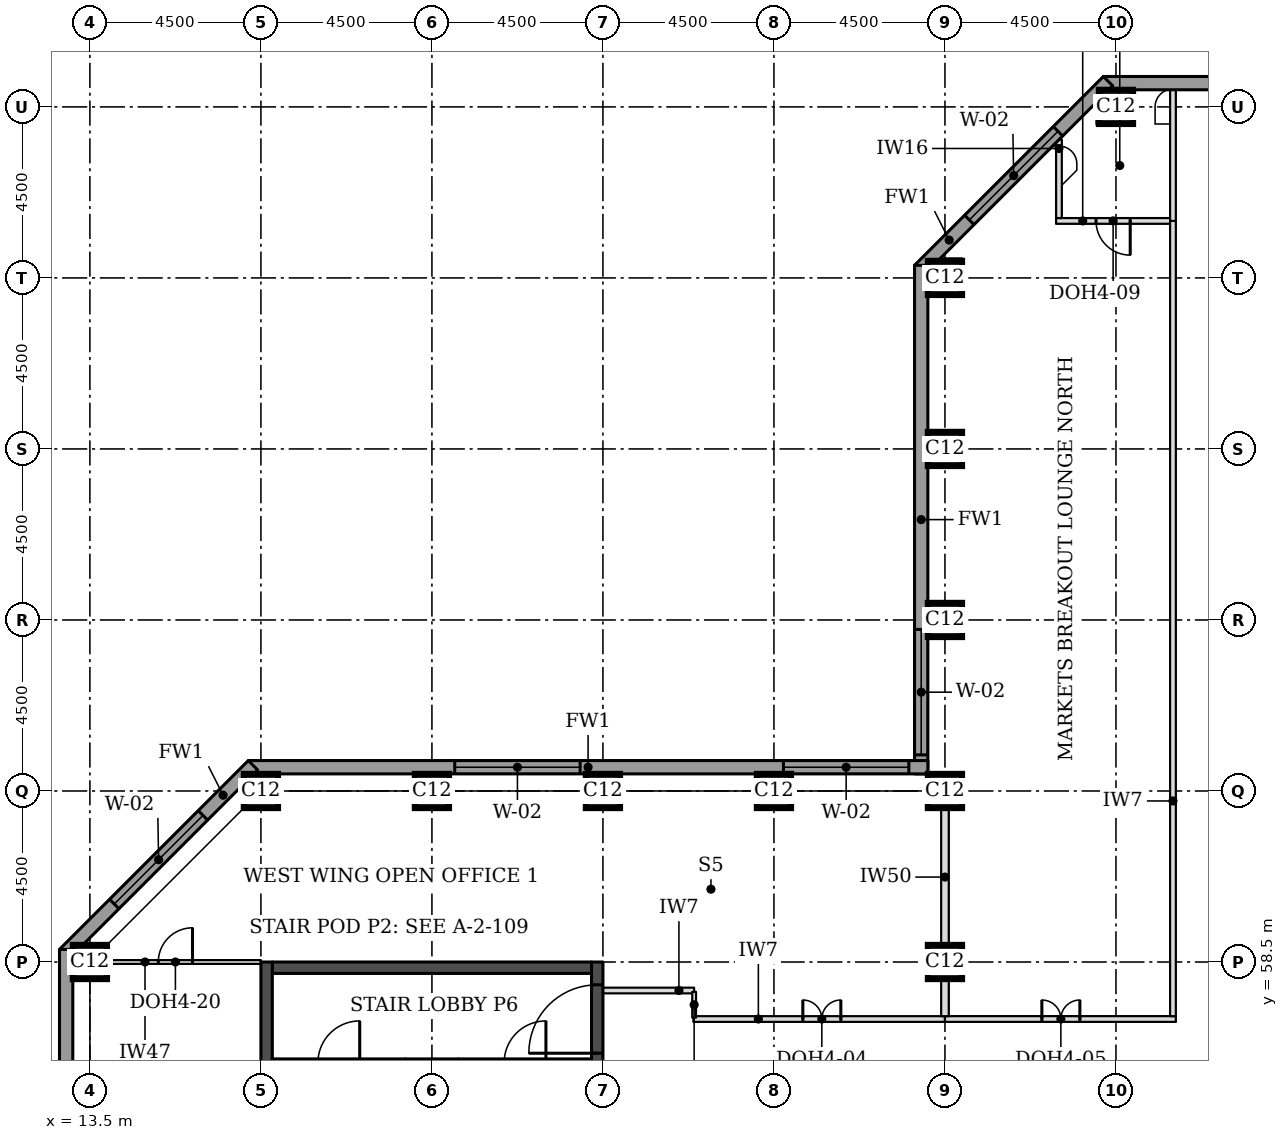
"""IFC4 building model, lengths in metres.
Left out: names, types, materials, properties, quantities, classifications, styles, units other than length and angle.
Written with IfcOpenShell. Run it as: python <this file> out.ifc"""

import sys

from ifc_helpers import new_model, si_unit, direction, frame, frame_2d, origin, origin_2d, place, context, subcontext, project, spatial, rectangle, extrude, element, fill, save


model = new_model("IFC4")
c1 = context("Model", 3, precision=1e-05, world=origin(), true_north=direction((0.0, 1.0)))
c2 = subcontext(c1, "Body", "Model", "MODEL_VIEW")
j1 = project(units=[si_unit("LENGTHUNIT", "METRE"), si_unit("PLANEANGLEUNIT", "RADIAN")], contexts=[c1])
p1 = place(None, origin())
s1 = spatial("IfcSite", under=j1, at=p1, CompositionType="ELEMENT")
p2 = place(p1, origin())
s2 = spatial("IfcBuilding", under=s1, at=p2, CompositionType="ELEMENT")
p3 = place(p2, frame((0.0, 0.0, 173.6)))
s3 = spatial("IfcBuildingStorey", under=s2, at=p3, CompositionType="ELEMENT", Elevation=173.6)
for number, where, z_axis, x_axis in (
    (1, (13.5, 58.5, 0.0), (0.0, 0.0, 1.0), (1.0, 0.0, 0.0)),
    (2, (36.0, 58.5, 0.0), (0.0, 0.0, 1.0), (1.0, 0.0, 0.0)),
    (3, (18.0, 63.0, 0.0), (0.0, 0.0, 1.0), (1.0, 0.0, 0.0)),
    (4, (22.5, 63.0, 0.0), (0.0, 0.0, 1.0), (1.0, 0.0, 0.0)),
    (5, (27.0, 63.0, 0.0), (0.0, 0.0, 1.0), (1.0, 0.0, 0.0)),
    (6, (31.5, 63.0, 0.0), (0.0, 0.0, 1.0), (1.0, 0.0, 0.0)),
    (7, (36.0, 63.0, 0.0), (0.0, 0.0, 1.0), (1.0, 0.0, 0.0)),
    (8, (36.0, 67.5, 0.0), (0.0, 0.0, 1.0), (1.0, 0.0, 0.0)),
    (9, (36.0, 72.0, 0.0), (0.0, 0.0, 1.0), (1.0, 0.0, 0.0)),
    (10, (36.0, 76.5, 0.0), (0.0, 0.0, 1.0), (1.0, 0.0, 0.0)),
    (11, (40.5, 81.0, 0.0), (0.0, 0.0, 1.0), (1.0, 0.0, 0.0)),
):
    element("IfcColumn", number, at=place(p3, frame(where, z_axis=z_axis, x_axis=x_axis)), inside=s3, PredefinedType="COLUMN", context=c2, shape_type="SweptSolid", body=[
        extrude(rectangle(XDim=0.9, YDim=0.9, at=origin_2d()), origin(), (0.0, 0.0, 1.0), 3.7),
    ])
p4 = place(p3, frame((18.3, 58.35, 0.0), z_axis=(0.0, 0.0, 1.0), x_axis=(1.0, 0.0, 0.0)))
e12 = element("IfcWall", 12, at=p4, inside=s3, PredefinedType="SHEAR", context=c2, shape_type="SweptSolid", body=[
    extrude(rectangle(XDim=8.4, YDim=0.3, at=frame_2d((4.2, 0.0))), origin(), (0.0, 0.0, 1.0), 3.7),
])
p5 = place(p3, frame((18.15, 49.5, 0.0), z_axis=(0.0, 0.0, 1.0), x_axis=(0.0, 1.0, 0.0)))
e13 = element("IfcWall", 13, at=p5, inside=s3, PredefinedType="SHEAR", context=c2, shape_type="SweptSolid", body=[
    extrude(rectangle(XDim=9.0, YDim=0.3, at=frame_2d((4.5, 0.0))), origin(), (0.0, 0.0, 1.0), 3.7),
])
p6 = place(p3, frame((26.85, 49.5, 0.0), z_axis=(0.0, 0.0, 1.0), x_axis=(0.0, 1.0, 0.0)))
e14 = element("IfcWall", 14, at=p6, inside=s3, PredefinedType="SHEAR", context=c2, shape_type="SweptSolid", body=[
    extrude(rectangle(XDim=9.0, YDim=0.3, at=frame_2d((4.5, 0.0))), origin(), (0.0, 0.0, 1.0), 3.7),
])
p7 = place(p6, frame((6.6, 0.0, 0.0)))
e15 = element("IfcOpeningElement", 15, at=p7, cuts=e14, PredefinedType="OPENING", context=c2, shape_type="SweptSolid", body=[
    extrude(rectangle(XDim=1.8, YDim=2.1, at=frame_2d((0.9, 1.05))), frame((0.0, 0.16, 0.0), z_axis=(0.0, -1.0, 0.0), x_axis=(1.0, 0.0, 0.0)), (0.0, 0.0, 1.0), 0.32),
])
p8 = place(p3, frame((72.331, 81.625, 0.0), z_axis=(0.0, 0.0, 1.0), x_axis=(-1.0, 0.0, 0.0)))
e16 = element("IfcWall", 16, at=p8, inside=s3, PredefinedType="STANDARD", context=c2, shape_type="SweptSolid", body=[
    extrude(rectangle(XDim=32.163, YDim=0.35, at=frame_2d((16.081, 0.0))), origin(), (0.0, 0.0, 1.0), 3.525),
])
p9 = place(p8, frame((5.431, 0.0, 0.9)))
e17 = element("IfcOpeningElement", 17, at=p9, cuts=e16, PredefinedType="OPENING", context=c2, shape_type="SweptSolid", body=[
    extrude(rectangle(XDim=3.3, YDim=1.9, at=frame_2d((1.65, 0.95))), frame((0.0, 0.185, 0.0), z_axis=(0.0, -1.0, 0.0), x_axis=(1.0, 0.0, 0.0)), (0.0, 0.0, 1.0), 0.37),
])
p10 = place(p8, frame((9.931, 0.0, 0.9)))
e18 = element("IfcOpeningElement", 18, at=p10, cuts=e16, PredefinedType="OPENING", context=c2, shape_type="SweptSolid", body=[
    extrude(rectangle(XDim=3.3, YDim=1.9, at=frame_2d((1.65, 0.95))), frame((0.0, 0.185, 0.0), z_axis=(0.0, -1.0, 0.0), x_axis=(1.0, 0.0, 0.0)), (0.0, 0.0, 1.0), 0.37),
])
p11 = place(p8, frame((14.431, 0.0, 0.9)))
e19 = element("IfcOpeningElement", 19, at=p11, cuts=e16, PredefinedType="OPENING", context=c2, shape_type="SweptSolid", body=[
    extrude(rectangle(XDim=3.3, YDim=1.9, at=frame_2d((1.65, 0.95))), frame((0.0, 0.185, 0.0), z_axis=(0.0, -1.0, 0.0), x_axis=(1.0, 0.0, 0.0)), (0.0, 0.0, 1.0), 0.37),
])
p12 = place(p8, frame((18.931, 0.0, 0.9)))
e20 = element("IfcOpeningElement", 20, at=p12, cuts=e16, PredefinedType="OPENING", context=c2, shape_type="SweptSolid", body=[
    extrude(rectangle(XDim=3.3, YDim=1.9, at=frame_2d((1.65, 0.95))), frame((0.0, 0.185, 0.0), z_axis=(0.0, -1.0, 0.0), x_axis=(1.0, 0.0, 0.0)), (0.0, 0.0, 1.0), 0.37),
])
p13 = place(p8, frame((23.431, 0.0, 0.9)))
e21 = element("IfcOpeningElement", 21, at=p13, cuts=e16, PredefinedType="OPENING", context=c2, shape_type="SweptSolid", body=[
    extrude(rectangle(XDim=3.3, YDim=1.9, at=frame_2d((1.65, 0.95))), frame((0.0, 0.185, 0.0), z_axis=(0.0, -1.0, 0.0), x_axis=(1.0, 0.0, 0.0)), (0.0, 0.0, 1.0), 0.37),
])
p14 = place(p3, frame((40.292, 81.676, 0.0), z_axis=(0.0, 0.0, 1.0), x_axis=(-0.707106781187, -0.707106781187, 0.0)))
e22 = element("IfcWall", 22, at=p14, inside=s3, PredefinedType="STANDARD", context=c2, shape_type="SweptSolid", body=[
    extrude(rectangle(XDim=7.027, YDim=0.35, at=frame_2d((3.513, 0.0))), origin(), (0.0, 0.0, 1.0), 3.525),
])
p15 = place(p14, frame((1.863, 0.0, 0.9)))
e23 = element("IfcOpeningElement", 23, at=p15, cuts=e22, PredefinedType="OPENING", context=c2, shape_type="SweptSolid", body=[
    extrude(rectangle(XDim=3.3, YDim=1.9, at=frame_2d((1.65, 0.95))), frame((0.0, 0.185, 0.0), z_axis=(0.0, -1.0, 0.0), x_axis=(1.0, 0.0, 0.0)), (0.0, 0.0, 1.0), 0.37),
])
p16 = place(p3, frame((35.375, 76.831, 0.0), z_axis=(0.0, 0.0, 1.0), x_axis=(0.0, -1.0, 0.0)))
e24 = element("IfcWall", 24, at=p16, inside=s3, PredefinedType="STANDARD", context=c2, shape_type="SweptSolid", body=[
    extrude(rectangle(XDim=13.381, YDim=0.35, at=frame_2d((6.691, 0.0))), origin(), (0.0, 0.0, 1.0), 3.525),
])
p17 = place(p16, frame((9.581, 0.0, 0.9)))
e25 = element("IfcOpeningElement", 25, at=p17, cuts=e24, PredefinedType="OPENING", context=c2, shape_type="SweptSolid", body=[
    extrude(rectangle(XDim=3.3, YDim=1.9, at=frame_2d((1.65, 0.95))), frame((0.0, 0.185, 0.0), z_axis=(0.0, -1.0, 0.0), x_axis=(1.0, 0.0, 0.0)), (0.0, 0.0, 1.0), 0.37),
])
p18 = place(p3, frame((35.55, 63.625, 0.0), z_axis=(0.0, 0.0, 1.0), x_axis=(-1.0, 0.0, 0.0)))
e26 = element("IfcWall", 26, at=p18, inside=s3, PredefinedType="STANDARD", context=c2, shape_type="SweptSolid", body=[
    extrude(rectangle(XDim=17.881, YDim=0.35, at=frame_2d((8.941, 0.0))), origin(), (0.0, 0.0, 1.0), 3.525),
])
p19 = place(p18, frame((0.5, 0.0, 0.9)))
e27 = element("IfcOpeningElement", 27, at=p19, cuts=e26, PredefinedType="OPENING", context=c2, shape_type="SweptSolid", body=[
    extrude(rectangle(XDim=3.3, YDim=1.9, at=frame_2d((1.65, 0.95))), frame((0.0, 0.185, 0.0), z_axis=(0.0, -1.0, 0.0), x_axis=(1.0, 0.0, 0.0)), (0.0, 0.0, 1.0), 0.37),
])
p20 = place(p18, frame((9.15, 0.0, 0.9)))
e28 = element("IfcOpeningElement", 28, at=p20, cuts=e26, PredefinedType="OPENING", context=c2, shape_type="SweptSolid", body=[
    extrude(rectangle(XDim=3.3, YDim=1.9, at=frame_2d((1.65, 0.95))), frame((0.0, 0.185, 0.0), z_axis=(0.0, -1.0, 0.0), x_axis=(1.0, 0.0, 0.0)), (0.0, 0.0, 1.0), 0.37),
])
p21 = place(p3, frame((17.792, 63.676, 0.0), z_axis=(0.0, 0.0, 1.0), x_axis=(-0.707106781187, -0.707106781187, 0.0)))
e29 = element("IfcWall", 29, at=p21, inside=s3, PredefinedType="STANDARD", context=c2, shape_type="SweptSolid", body=[
    extrude(rectangle(XDim=7.027, YDim=0.35, at=frame_2d((3.513, 0.0))), origin(), (0.0, 0.0, 1.0), 3.525),
])
p22 = place(p21, frame((1.863, 0.0, 0.9)))
e30 = element("IfcOpeningElement", 30, at=p22, cuts=e29, PredefinedType="OPENING", context=c2, shape_type="SweptSolid", body=[
    extrude(rectangle(XDim=3.3, YDim=1.9, at=frame_2d((1.65, 0.95))), frame((0.0, 0.185, 0.0), z_axis=(0.0, -1.0, 0.0), x_axis=(1.0, 0.0, 0.0)), (0.0, 0.0, 1.0), 0.37),
])
p23 = place(p3, frame((12.875, 58.831, 0.0), z_axis=(0.0, 0.0, 1.0), x_axis=(0.0, -1.0, 0.0)))
e31 = element("IfcWall", 31, at=p23, inside=s3, PredefinedType="STANDARD", context=c2, shape_type="SweptSolid", body=[
    extrude(rectangle(XDim=14.163, YDim=0.35, at=frame_2d((7.081, 0.0))), origin(), (0.0, 0.0, 1.0), 3.525),
])
p24 = place(p23, frame((5.431, 0.0, 0.9)))
e32 = element("IfcOpeningElement", 32, at=p24, cuts=e31, PredefinedType="OPENING", context=c2, shape_type="SweptSolid", body=[
    extrude(rectangle(XDim=3.3, YDim=1.9, at=frame_2d((1.65, 0.95))), frame((0.0, 0.185, 0.0), z_axis=(0.0, -1.0, 0.0), x_axis=(1.0, 0.0, 0.0)), (0.0, 0.0, 1.0), 0.37),
])
p25 = place(p3, frame((29.38, 57.0, 0.0), z_axis=(0.0, 0.0, 1.0), x_axis=(1.0, 0.0, 0.0)))
e33 = element("IfcWall", 33, at=p25, inside=s3, PredefinedType="PARTITIONING", context=c2, shape_type="SweptSolid", body=[
    extrude(rectangle(XDim=6.62, YDim=0.15, at=frame_2d((3.31, 0.0))), origin(), (0.0, 0.0, 1.0), 3.55),
])
p26 = place(p25, frame((2.88, 0.0, 0.0)))
e34 = element("IfcOpeningElement", 34, at=p26, cuts=e33, PredefinedType="OPENING", context=c2, shape_type="SweptSolid", body=[
    extrude(rectangle(XDim=1.0, YDim=2.1, at=frame_2d((0.5, 1.05))), frame((0.0, 0.085, 0.0), z_axis=(0.0, -1.0, 0.0), x_axis=(1.0, 0.0, 0.0)), (0.0, 0.0, 1.0), 0.17),
])
p27 = place(p3, frame((36.0, 57.0, 0.0), z_axis=(0.0, 0.0, 1.0), x_axis=(1.0, 0.0, 0.0)))
e35 = element("IfcWall", 35, at=p27, inside=s3, PredefinedType="PARTITIONING", context=c2, shape_type="SweptSolid", body=[
    extrude(rectangle(XDim=6.075, YDim=0.15, at=frame_2d((3.038, 0.0))), origin(), (0.0, 0.0, 1.0), 3.55),
])
p28 = place(p27, frame((2.55, 0.0, 0.0)))
e36 = element("IfcOpeningElement", 36, at=p28, cuts=e35, PredefinedType="OPENING", context=c2, shape_type="SweptSolid", body=[
    extrude(rectangle(XDim=1.0, YDim=2.1, at=frame_2d((0.5, 1.05))), frame((0.0, 0.085, 0.0), z_axis=(0.0, -1.0, 0.0), x_axis=(1.0, 0.0, 0.0)), (0.0, 0.0, 1.0), 0.17),
])
p29 = place(p3, frame((38.925, 78.0, 0.0), z_axis=(0.0, 0.0, 1.0), x_axis=(1.0, 0.0, 0.0)))
e37 = element("IfcWall", 37, at=p29, inside=s3, PredefinedType="PARTITIONING", context=c2, shape_type="SweptSolid", body=[
    extrude(rectangle(XDim=3.0, YDim=0.15, at=frame_2d((1.5, 0.0))), origin(), (0.0, 0.0, 1.0), 3.55),
])
p30 = place(p29, frame((1.05, 0.0, 0.0)))
e38 = element("IfcOpeningElement", 38, at=p30, cuts=e37, PredefinedType="OPENING", context=c2, shape_type="SweptSolid", body=[
    extrude(rectangle(XDim=0.9, YDim=2.1, at=frame_2d((0.45, 1.05))), frame((0.0, 0.085, 0.0), z_axis=(0.0, -1.0, 0.0), x_axis=(1.0, 0.0, 0.0)), (0.0, 0.0, 1.0), 0.17),
])
p31 = place(p3, frame((36.0, 57.075, 0.0), z_axis=(0.0, 0.0, 1.0), x_axis=(0.0, 1.0, 0.0)))
e39 = element("IfcWall", 39, at=p31, inside=s3, PredefinedType="PARTITIONING", context=c2, shape_type="SweptSolid", body=[
    extrude(rectangle(XDim=0.975, YDim=0.2, at=frame_2d((0.488, 0.0))), origin(), (0.0, 0.0, 1.0), 2.8),
])
p32 = place(p3, frame((42.0, 57.075, 0.0), z_axis=(0.0, 0.0, 1.0), x_axis=(0.0, 1.0, 0.0)))
e40 = element("IfcWall", 40, at=p32, inside=s3, PredefinedType="PARTITIONING", context=c2, shape_type="SweptSolid", body=[
    extrude(rectangle(XDim=20.925, YDim=0.15, at=frame_2d((10.462, 0.0))), origin(), (0.0, 0.0, 1.0), 3.55),
])
p33 = place(p3, frame((36.0, 58.92, 0.0), z_axis=(0.0, 0.0, 1.0), x_axis=(0.0, 1.0, 0.0)))
e41 = element("IfcWall", 41, at=p33, inside=s3, PredefinedType="PARTITIONING", context=c2, shape_type="SweptSolid", body=[
    extrude(rectangle(XDim=3.63, YDim=0.2, at=frame_2d((1.815, 0.0))), origin(), (0.0, 0.0, 1.0), 2.8),
])
p34 = place(p3, frame((42.0, 78.0, 0.0), z_axis=(0.0, 0.0, 1.0), x_axis=(0.0, 1.0, 0.0)))
e42 = element("IfcWall", 42, at=p34, inside=s3, PredefinedType="PARTITIONING", context=c2, shape_type="SweptSolid", body=[
    extrude(rectangle(XDim=3.45, YDim=0.15, at=frame_2d((1.725, 0.0))), origin(), (0.0, 0.0, 1.0), 3.55),
])
p35 = place(p3, frame((39.0, 78.075, 0.0), z_axis=(0.0, 0.0, 1.0), x_axis=(0.0, 1.0, 0.0)))
e43 = element("IfcWall", 43, at=p35, inside=s3, PredefinedType="PARTITIONING", context=c2, shape_type="SweptSolid", body=[
    extrude(rectangle(XDim=2.062, YDim=0.15, at=frame_2d((1.031, 0.0))), origin(), (0.0, 0.0, 1.0), 3.55),
])
p36 = place(p3, frame((13.5, 58.5, 0.0), z_axis=(0.0, 0.0, 1.0), x_axis=(1.0, 0.0, 0.0)))
e44 = element("IfcWall", 44, at=p36, inside=s3, PredefinedType="PARTITIONING", context=c2, shape_type="SweptSolid", body=[
    extrude(rectangle(XDim=4.5, YDim=0.1, at=frame_2d((2.25, 0.0))), origin(), (0.0, 0.0, 1.0), 2.55),
])
p37 = place(p36, frame((1.8, 0.0, 0.0)))
e45 = element("IfcOpeningElement", 45, at=p37, cuts=e44, PredefinedType="OPENING", context=c2, shape_type="SweptSolid", body=[
    extrude(rectangle(XDim=0.9, YDim=2.1, at=frame_2d((0.45, 1.05))), frame((0.0, 0.06, 0.0), z_axis=(0.0, -1.0, 0.0), x_axis=(1.0, 0.0, 0.0)), (0.0, 0.0, 1.0), 0.12),
])
p38 = place(p3, frame((27.0, 57.75, 0.0), z_axis=(0.0, 0.0, 1.0), x_axis=(1.0, 0.0, 0.0)))
e46 = element("IfcWall", 46, at=p38, inside=s3, PredefinedType="PARTITIONING", context=c2, shape_type="SweptSolid", body=[
    extrude(rectangle(XDim=2.4, YDim=0.15, at=frame_2d((1.2, 0.0))), origin(), (0.0, 0.0, 1.0), 3.55),
])
p39 = place(p3, frame((29.4, 57.715, 0.0), z_axis=(0.0, 0.0, 1.0), x_axis=(0.0, -1.0, 0.0)))
e47 = element("IfcWall", 47, at=p39, inside=s3, PredefinedType="PARTITIONING", context=c2, shape_type="SweptSolid", body=[
    extrude(rectangle(XDim=0.68, YDim=0.1, at=frame_2d((0.34, 0.0))), origin(), (0.0, 0.0, 1.0), 3.55),
])
p40 = place(p3, frame((21.8, 55.85, 0.0), z_axis=(0.0, 0.0, 1.0), x_axis=(1.0, 0.0, 0.0)))
e48 = element("IfcWall", 48, at=p40, inside=s3, PredefinedType="SOLIDWALL", context=c2, shape_type="SweptSolid", body=[
    extrude(rectangle(XDim=1.4, YDim=0.2, at=frame_2d((0.7, 0.0))), origin(), (0.0, 0.0, 1.0), 3.55),
])
p41 = place(p3, frame((18.3, 55.85, 0.0), z_axis=(0.0, 0.0, 1.0), x_axis=(1.0, 0.0, 0.0)))
e49 = element("IfcWall", 49, at=p41, inside=s3, PredefinedType="SOLIDWALL", context=c2, shape_type="SweptSolid", body=[
    extrude(rectangle(XDim=3.5, YDim=0.2, at=frame_2d((1.75, 0.0))), origin(), (0.0, 0.0, 1.0), 3.55),
])
p42 = place(p41, frame((1.2, 0.0, 0.0)))
e50 = element("IfcOpeningElement", 50, at=p42, cuts=e49, PredefinedType="OPENING", context=c2, shape_type="SweptSolid", body=[
    extrude(rectangle(XDim=1.1, YDim=2.1, at=frame_2d((0.55, 1.05))), frame((0.0, 0.11, 0.0), z_axis=(0.0, -1.0, 0.0), x_axis=(1.0, 0.0, 0.0)), (0.0, 0.0, 1.0), 0.22),
])
p43 = place(p3, frame((23.2, 55.85, 0.0), z_axis=(0.0, 0.0, 1.0), x_axis=(1.0, 0.0, 0.0)))
e51 = element("IfcWall", 51, at=p43, inside=s3, PredefinedType="SOLIDWALL", context=c2, shape_type="SweptSolid", body=[
    extrude(rectangle(XDim=3.5, YDim=0.2, at=frame_2d((1.75, 0.0))), origin(), (0.0, 0.0, 1.0), 3.55),
])
p44 = place(p43, frame((1.2, 0.0, 0.0)))
e52 = element("IfcOpeningElement", 52, at=p44, cuts=e51, PredefinedType="OPENING", context=c2, shape_type="SweptSolid", body=[
    extrude(rectangle(XDim=1.1, YDim=2.1, at=frame_2d((0.55, 1.05))), frame((0.0, 0.11, 0.0), z_axis=(0.0, -1.0, 0.0), x_axis=(1.0, 0.0, 0.0)), (0.0, 0.0, 1.0), 0.22),
])
p45 = place(p15, origin())
e53 = element("IfcWindow", 53, at=p45, inside=s3, PartitioningType="SINGLE_PANEL", PredefinedType="WINDOW", context=c2, shape_type="SweptSolid", body=[
    extrude(rectangle(XDim=3.3, YDim=1.9, at=frame_2d((1.65, 0.95))), frame((0.0, 0.085, 0.0), z_axis=(0.0, -1.0, 0.0), x_axis=(1.0, 0.0, 0.0)), (0.0, 0.0, 1.0), 0.06),
])
fill(e23, e53)
p46 = place(p17, origin())
e54 = element("IfcWindow", 54, at=p46, inside=s3, PartitioningType="SINGLE_PANEL", PredefinedType="WINDOW", context=c2, shape_type="SweptSolid", body=[
    extrude(rectangle(XDim=3.3, YDim=1.9, at=frame_2d((1.65, 0.95))), frame((0.0, 0.085, 0.0), z_axis=(0.0, -1.0, 0.0), x_axis=(1.0, 0.0, 0.0)), (0.0, 0.0, 1.0), 0.06),
])
fill(e25, e54)
p47 = place(p19, origin())
e55 = element("IfcWindow", 55, at=p47, inside=s3, PartitioningType="SINGLE_PANEL", PredefinedType="WINDOW", context=c2, shape_type="SweptSolid", body=[
    extrude(rectangle(XDim=3.3, YDim=1.9, at=frame_2d((1.65, 0.95))), frame((0.0, 0.085, 0.0), z_axis=(0.0, -1.0, 0.0), x_axis=(1.0, 0.0, 0.0)), (0.0, 0.0, 1.0), 0.06),
])
fill(e27, e55)
p48 = place(p20, origin())
e56 = element("IfcWindow", 56, at=p48, inside=s3, PartitioningType="SINGLE_PANEL", PredefinedType="WINDOW", context=c2, shape_type="SweptSolid", body=[
    extrude(rectangle(XDim=3.3, YDim=1.9, at=frame_2d((1.65, 0.95))), frame((0.0, 0.085, 0.0), z_axis=(0.0, -1.0, 0.0), x_axis=(1.0, 0.0, 0.0)), (0.0, 0.0, 1.0), 0.06),
])
fill(e28, e56)
p49 = place(p22, origin())
e57 = element("IfcWindow", 57, at=p49, inside=s3, PartitioningType="SINGLE_PANEL", PredefinedType="WINDOW", context=c2, shape_type="SweptSolid", body=[
    extrude(rectangle(XDim=3.3, YDim=1.9, at=frame_2d((1.65, 0.95))), frame((0.0, 0.085, 0.0), z_axis=(0.0, -1.0, 0.0), x_axis=(1.0, 0.0, 0.0)), (0.0, 0.0, 1.0), 0.06),
])
fill(e30, e57)
p50 = place(p28, origin())
e58 = element("IfcDoor", 58, at=p50, inside=s3, OperationType="DOUBLE_DOOR_SINGLE_SWING", PredefinedType="DOOR", context=c2, shape_type="SweptSolid", body=[
    extrude(rectangle(XDim=1.0, YDim=2.1, at=frame_2d((0.5, 1.05))), frame((0.0, 0.025, 0.0), z_axis=(0.0, -1.0, 0.0), x_axis=(1.0, 0.0, 0.0)), (0.0, 0.0, 1.0), 0.05),
])
fill(e36, e58)
p51 = place(p30, frame((0.9, 0.0, 0.0), z_axis=(0.0, 0.0, 1.0), x_axis=(-1.0, 0.0, 0.0)))
e59 = element("IfcDoor", 59, at=p51, inside=s3, OperationType="SINGLE_SWING_LEFT", PredefinedType="DOOR", context=c2, shape_type="SweptSolid", body=[
    extrude(rectangle(XDim=0.9, YDim=2.1, at=frame_2d((0.45, 1.05))), frame((0.0, 0.025, 0.0), z_axis=(0.0, -1.0, 0.0), x_axis=(1.0, 0.0, 0.0)), (0.0, 0.0, 1.0), 0.05),
])
fill(e38, e59)
p52 = place(p26, origin())
e60 = element("IfcDoor", 60, at=p52, inside=s3, OperationType="DOUBLE_DOOR_SINGLE_SWING", PredefinedType="DOOR", context=c2, shape_type="SweptSolid", body=[
    extrude(rectangle(XDim=1.0, YDim=2.1, at=frame_2d((0.5, 1.05))), frame((0.0, 0.025, 0.0), z_axis=(0.0, -1.0, 0.0), x_axis=(1.0, 0.0, 0.0)), (0.0, 0.0, 1.0), 0.05),
])
fill(e34, e60)
p53 = place(p37, origin())
e61 = element("IfcDoor", 61, at=p53, inside=s3, OperationType="SINGLE_SWING_RIGHT", PredefinedType="DOOR", context=c2, shape_type="SweptSolid", body=[
    extrude(rectangle(XDim=0.9, YDim=2.1, at=frame_2d((0.45, 1.05))), frame((0.0, 0.025, 0.0), z_axis=(0.0, -1.0, 0.0), x_axis=(1.0, 0.0, 0.0)), (0.0, 0.0, 1.0), 0.05),
])
fill(e45, e61)
p54 = place(p7, origin())
e62 = element("IfcDoor", 62, at=p54, inside=s3, OperationType="SINGLE_SWING_LEFT", PredefinedType="DOOR", context=c2, shape_type="SweptSolid", body=[
    extrude(rectangle(XDim=1.8, YDim=2.1, at=frame_2d((0.9, 1.05))), frame((0.0, 0.025, 0.0), z_axis=(0.0, -1.0, 0.0), x_axis=(1.0, 0.0, 0.0)), (0.0, 0.0, 1.0), 0.05),
])
fill(e15, e62)
save(model, sys.argv[1])
